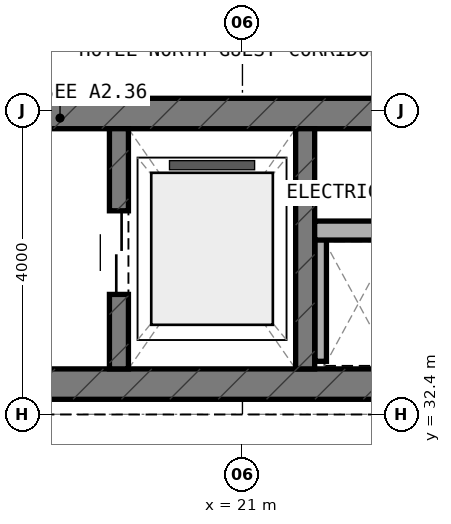
"""IFC4 building model, lengths in metres.
Left out: names, types, materials, properties, quantities, classifications, styles, units other than length and angle.
Written with IfcOpenShell. Run it as: python <this file> out.ifc"""

import sys

from ifc_helpers import new_model, si_unit, direction, frame, frame_2d, origin, place, context, subcontext, project, spatial, rectangle, extrude, element, fill, save


model = new_model("IFC4")
c1 = context("Model", 3, precision=1e-05, world=origin(), true_north=direction((0.0, 1.0)))
c2 = subcontext(c1, "Body", "Model", "MODEL_VIEW")
j1 = project(units=[si_unit("LENGTHUNIT", "METRE"), si_unit("PLANEANGLEUNIT", "RADIAN")], contexts=[c1])
p1 = place(None, origin())
s1 = spatial("IfcSite", under=j1, at=p1, CompositionType="ELEMENT")
p2 = place(p1, origin())
s2 = spatial("IfcBuilding", under=s1, at=p2, CompositionType="ELEMENT")
p3 = place(p2, frame((0.0, 0.0, 159.0)))
s3 = spatial("IfcBuildingStorey", under=s2, at=p3, CompositionType="ELEMENT", Elevation=159.0)
p4 = place(p3, frame((6.4, 32.8, 0.0), z_axis=(0.0, 0.0, 1.0), x_axis=(1.0, 0.0, 0.0)))
e1 = element("IfcWall", 1, at=p4, inside=s3, PredefinedType="SHEAR", context=c2, shape_type="SweptSolid", body=[
    extrude(rectangle(XDim=24.4, YDim=0.4, at=frame_2d((12.2, 0.0))), origin(), (0.0, 0.0, 1.0), 3.5),
])
p5 = place(p4, frame((6.05, 0.0, 0.0)))
e2 = element("IfcOpeningElement", 2, at=p5, cuts=e1, PredefinedType="OPENING", context=c2, shape_type="SweptSolid", body=[
    extrude(rectangle(XDim=1.1, YDim=2.15, at=frame_2d((0.55, 1.075))), frame((0.0, 0.21, 0.0), z_axis=(0.0, -1.0, 0.0), x_axis=(1.0, 0.0, 0.0)), (0.0, 0.0, 1.0), 0.42),
])
p6 = place(p3, frame((6.4, 36.36, 0.0), z_axis=(0.0, 0.0, 1.0), x_axis=(1.0, 0.0, 0.0)))
e3 = element("IfcWall", 3, at=p6, inside=s3, PredefinedType="SHEAR", context=c2, shape_type="SweptSolid", body=[
    extrude(rectangle(XDim=24.4, YDim=0.4, at=frame_2d((12.2, 0.0))), origin(), (0.0, 0.0, 1.0), 3.5),
])
p7 = place(p6, frame((9.15, 0.0, 0.0)))
e4 = element("IfcOpeningElement", 4, at=p7, cuts=e3, PredefinedType="OPENING", context=c2, shape_type="SweptSolid", body=[
    extrude(rectangle(XDim=1.2, YDim=2.15, at=frame_2d((0.6, 1.075))), frame((0.0, 0.21, 0.0), z_axis=(0.0, -1.0, 0.0), x_axis=(1.0, 0.0, 0.0)), (0.0, 0.0, 1.0), 0.42),
])
p8 = place(p6, frame((19.2, 0.0, 0.0)))
e5 = element("IfcOpeningElement", 5, at=p8, cuts=e3, PredefinedType="OPENING", context=c2, shape_type="SweptSolid", body=[
    extrude(rectangle(XDim=0.85, YDim=2.1, at=frame_2d((0.425, 1.05))), frame((0.0, 0.21, 0.0), z_axis=(0.0, -1.0, 0.0), x_axis=(1.0, 0.0, 0.0)), (0.0, 0.0, 1.0), 0.42),
])
p9 = place(p6, frame((16.94, 0.0, 0.0)))
e6 = element("IfcOpeningElement", 6, at=p9, cuts=e3, PredefinedType="OPENING", context=c2, shape_type="SweptSolid", body=[
    extrude(rectangle(XDim=0.85, YDim=2.1, at=frame_2d((0.425, 1.05))), frame((0.0, 0.21, 0.0), z_axis=(0.0, -1.0, 0.0), x_axis=(1.0, 0.0, 0.0)), (0.0, 0.0, 1.0), 0.42),
])
p10 = place(p3, frame((19.375, 33.0, 0.0), z_axis=(0.0, 0.0, 1.0), x_axis=(0.0, 1.0, 0.0)))
e7 = element("IfcWall", 7, at=p10, inside=s3, PredefinedType="STANDARD", context=c2, shape_type="SweptSolid", body=[
    extrude(rectangle(XDim=3.16, YDim=0.25, at=frame_2d((1.58, 0.0))), origin(), (0.0, 0.0, 1.0), 3.22),
])
p11 = place(p10, frame((0.98, 0.0, 0.0)))
e8 = element("IfcOpeningElement", 8, at=p11, cuts=e7, PredefinedType="OPENING", context=c2, shape_type="SweptSolid", body=[
    extrude(rectangle(XDim=1.1, YDim=2.15, at=frame_2d((0.55, 1.075))), frame((0.0, 0.135, 0.0), z_axis=(0.0, -1.0, 0.0), x_axis=(1.0, 0.0, 0.0)), (0.0, 0.0, 1.0), 0.27),
])
p12 = place(p3, frame((21.825, 33.0, 0.0), z_axis=(0.0, 0.0, 1.0), x_axis=(0.0, 1.0, 0.0)))
e9 = element("IfcWall", 9, at=p12, inside=s3, PredefinedType="STANDARD", context=c2, shape_type="SweptSolid", body=[
    extrude(rectangle(XDim=3.16, YDim=0.25, at=frame_2d((1.58, 0.0))), origin(), (0.0, 0.0, 1.0), 3.22),
])
p13 = place(p3, frame((22.03, 33.1, 0.0), z_axis=(0.0, 0.0, 1.0), x_axis=(0.0, 1.0, 0.0)))
e10 = element("IfcWall", 10, at=p13, inside=s3, PredefinedType="PARTITIONING", context=c2, shape_type="SweptSolid", body=[
    extrude(rectangle(XDim=1.62, YDim=0.15, at=frame_2d((0.81, 0.0))), origin(), (0.0, 0.0, 1.0), 3.22),
])
p14 = place(p3, frame((21.95, 34.82, 0.0), z_axis=(0.0, 0.0, 1.0), x_axis=(1.0, 0.0, 0.0)))
e11 = element("IfcWall", 11, at=p14, inside=s3, PredefinedType="SOLIDWALL", context=c2, shape_type="SweptSolid", body=[
    extrude(rectangle(XDim=1.15, YDim=0.25, at=frame_2d((0.575, 0.0))), origin(), (0.0, 0.0, 1.0), 3.22),
])
p15 = place(p11, origin())
e12 = element("IfcDoor", 12, at=p15, inside=s3, OperationType="DOUBLE_DOOR_SLIDING", PredefinedType="DOOR", context=c2, shape_type="SweptSolid", body=[
    extrude(rectangle(XDim=1.1, YDim=2.15, at=frame_2d((0.55, 1.075))), frame((0.0, 0.025, 0.0), z_axis=(0.0, -1.0, 0.0), x_axis=(1.0, 0.0, 0.0)), (0.0, 0.0, 1.0), 0.05),
])
fill(e8, e12)
save(model, sys.argv[1])
